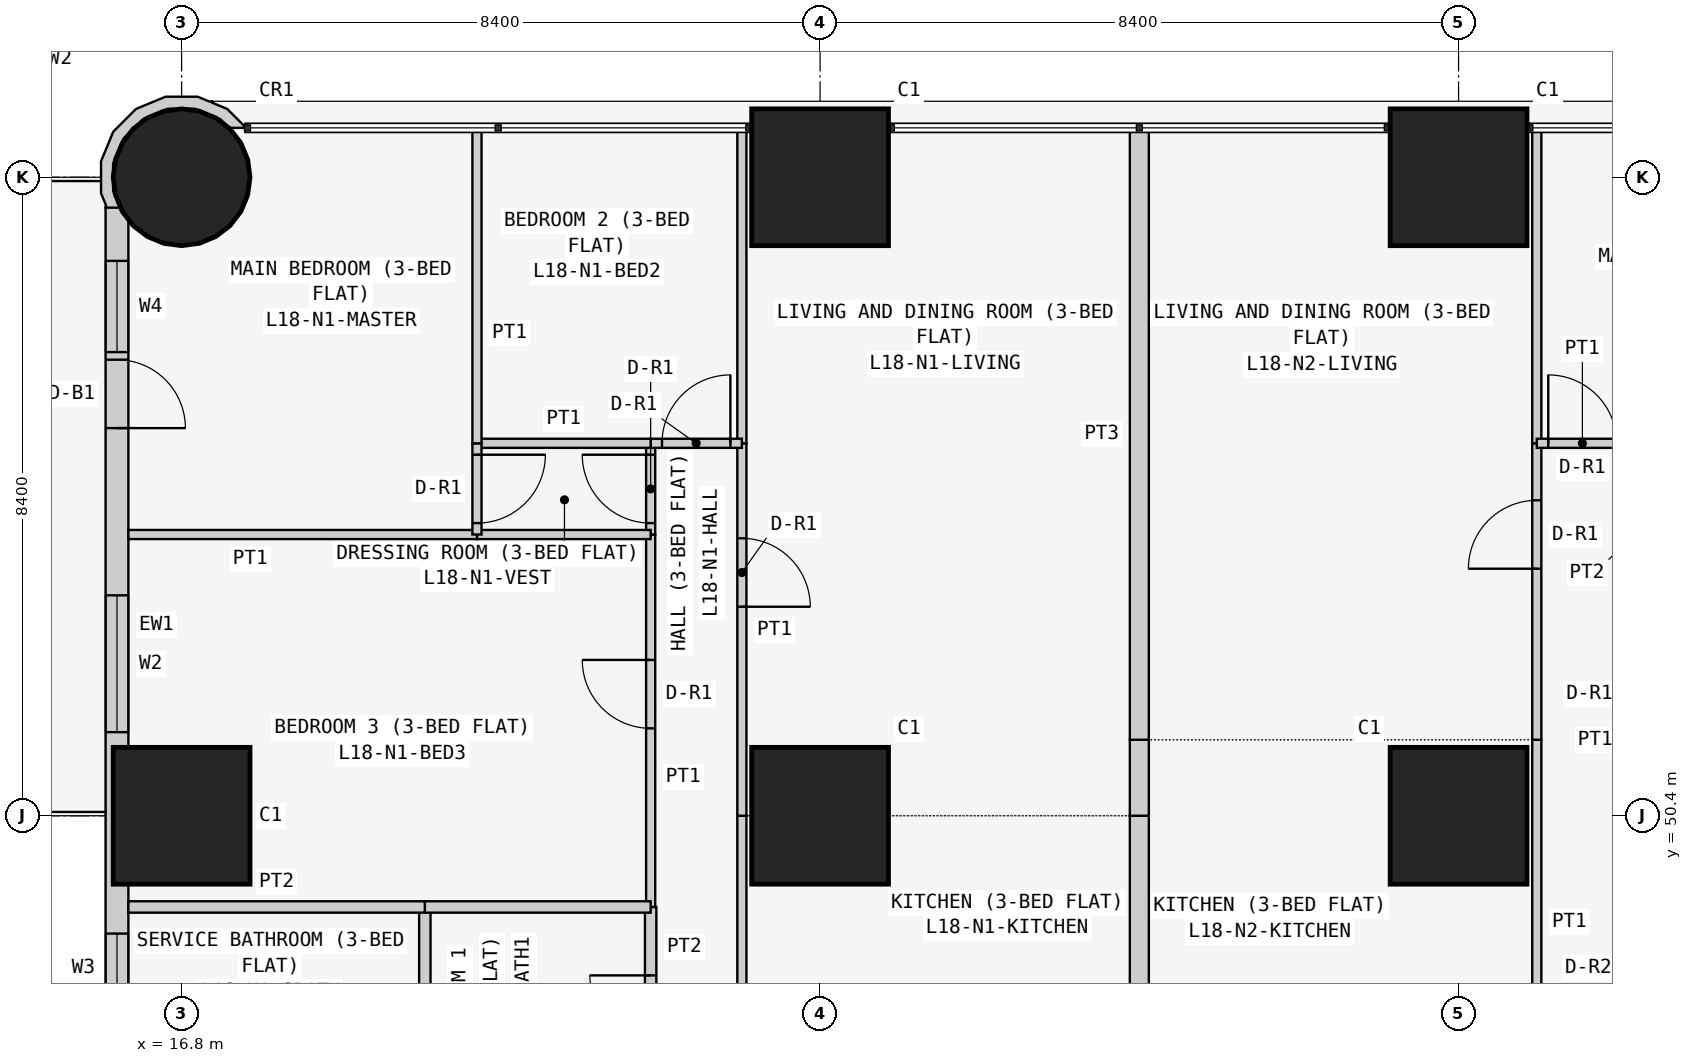
"""IFC4 building model, lengths in metres.
Left out: names, types, materials, properties, quantities, classifications, styles, units other than length and angle.
Written with IfcOpenShell. Run it as: python <this file> out.ifc"""

import sys

from ifc_helpers import new_model, si_unit, direction, frame, frame_2d, origin, origin_2d, place, context, subcontext, project, spatial, polyline, rectangle, circle, outline, extrude, element, fill, save


model = new_model("IFC4")
c1 = context("Model", 3, precision=1e-05, world=origin(), true_north=direction((0.0, 1.0)))
c2 = subcontext(c1, "Body", "Model", "MODEL_VIEW")
j1 = project(units=[si_unit("LENGTHUNIT", "METRE"), si_unit("PLANEANGLEUNIT", "RADIAN")], contexts=[c1])
p1 = place(None, origin())
s1 = spatial("IfcSite", under=j1, at=p1, CompositionType="ELEMENT")
p2 = place(p1, origin())
s2 = spatial("IfcBuilding", under=s1, at=p2, CompositionType="ELEMENT")
p3 = place(p2, frame((0.0, 0.0, 74.1)))
s3 = spatial("IfcBuildingStorey", under=s2, at=p3, CompositionType="ELEMENT", Elevation=74.1)
p4 = place(p3, frame((16.8, 50.4, 0.0), z_axis=(0.0, 0.0, 1.0), x_axis=(1.0, 0.0, 0.0)))
e1 = element("IfcColumn", 1, at=p4, inside=s3, PredefinedType="COLUMN", context=c2, shape_type="SweptSolid", body=[
    extrude(rectangle(XDim=1.8, YDim=1.8, at=origin_2d()), origin(), (0.0, 0.0, 1.0), 3.6),
])
p5 = place(p3, frame((16.8, 58.8, 0.0), z_axis=(0.0, 0.0, 1.0), x_axis=(1.0, 0.0, 0.0)))
e2 = element("IfcColumn", 2, at=p5, inside=s3, PredefinedType="COLUMN", context=c2, shape_type="SweptSolid", body=[
    extrude(circle(Radius=0.9, at=origin_2d()), origin(), (0.0, 0.0, 1.0), 3.6),
])
for number, where, z_axis, x_axis in (
    (3, (25.2, 50.4, 0.0), (0.0, 0.0, 1.0), (1.0, 0.0, 0.0)),
    (4, (25.2, 58.8, 0.0), (0.0, 0.0, 1.0), (1.0, 0.0, 0.0)),
    (5, (33.6, 50.4, 0.0), (0.0, 0.0, 1.0), (1.0, 0.0, 0.0)),
    (6, (33.6, 58.8, 0.0), (0.0, 0.0, 1.0), (1.0, 0.0, 0.0)),
):
    element("IfcColumn", number, at=place(p3, frame(where, z_axis=z_axis, x_axis=x_axis)), inside=s3, PredefinedType="COLUMN", context=c2, shape_type="SweptSolid", body=[
        extrude(rectangle(XDim=1.8, YDim=1.8, at=origin_2d()), origin(), (0.0, 0.0, 1.0), 3.6),
    ])
p6 = place(p3, frame((15.95, 58.4, 0.0), z_axis=(0.0, 0.0, 1.0), x_axis=(0.0, -1.0, 0.0)))
e7 = element("IfcWall", 7, at=p6, inside=s3, PredefinedType="SOLIDWALL", context=c2, shape_type="SweptSolid", body=[
    extrude(rectangle(XDim=15.7, YDim=0.3, at=frame_2d((7.85, 0.0))), origin(), (0.0, 0.0, 1.0), 3.45),
])
p7 = place(p6, frame((12.4, 0.0, 0.9)))
e8 = element("IfcOpeningElement", 8, at=p7, cuts=e7, PredefinedType="OPENING", context=c2, shape_type="SweptSolid", body=[
    extrude(rectangle(XDim=1.8, YDim=1.5, at=frame_2d((0.9, 0.75))), frame((0.0, 0.16, 0.0), z_axis=(0.0, -1.0, 0.0), x_axis=(1.0, 0.0, 0.0)), (0.0, 0.0, 1.0), 0.32),
])
p8 = place(p6, frame((9.55, 0.0, 1.5)))
e9 = element("IfcOpeningElement", 9, at=p8, cuts=e7, PredefinedType="OPENING", context=c2, shape_type="SweptSolid", body=[
    extrude(rectangle(XDim=0.9, YDim=0.7, at=frame_2d((0.45, 0.35))), frame((0.0, 0.16, 0.0), z_axis=(0.0, -1.0, 0.0), x_axis=(1.0, 0.0, 0.0)), (0.0, 0.0, 1.0), 0.32),
])
p9 = place(p6, frame((5.1, 0.0, 0.9)))
e10 = element("IfcOpeningElement", 10, at=p9, cuts=e7, PredefinedType="OPENING", context=c2, shape_type="SweptSolid", body=[
    extrude(rectangle(XDim=1.8, YDim=1.5, at=frame_2d((0.9, 0.75))), frame((0.0, 0.16, 0.0), z_axis=(0.0, -1.0, 0.0), x_axis=(1.0, 0.0, 0.0)), (0.0, 0.0, 1.0), 0.32),
])
p10 = place(p6, frame((2.0, 0.0, 0.0)))
e11 = element("IfcOpeningElement", 11, at=p10, cuts=e7, PredefinedType="OPENING", context=c2, shape_type="SweptSolid", body=[
    extrude(rectangle(XDim=0.9, YDim=2.4, at=frame_2d((0.45, 1.2))), frame((0.0, 0.16, 0.0), z_axis=(0.0, -1.0, 0.0), x_axis=(1.0, 0.0, 0.0)), (0.0, 0.0, 1.0), 0.32),
])
p11 = place(p6, frame((0.7, 0.0, 0.9)))
e12 = element("IfcOpeningElement", 12, at=p11, cuts=e7, PredefinedType="OPENING", context=c2, shape_type="SweptSolid", body=[
    extrude(rectangle(XDim=1.2, YDim=1.5, at=frame_2d((0.6, 0.75))), frame((0.0, 0.16, 0.0), z_axis=(0.0, -1.0, 0.0), x_axis=(1.0, 0.0, 0.0)), (0.0, 0.0, 1.0), 0.32),
])
p12 = place(p3, frame((17.567, 59.411, 0.0), z_axis=(0.0, 0.0, 1.0), x_axis=(-0.377204953059, 0.926129809145, 0.0)))
e13 = element("IfcWall", 13, at=p12, inside=s3, PredefinedType="SOLIDWALL", context=c2, shape_type="SweptSolid", body=[
    extrude(outline(polyline([(-0.27, 2.017), (-0.37, 1.841), (-0.102, 1.842), (0.23, 1.707), (0.484, 1.455), (0.624, 1.125), (0.626, 0.766), (0.491, 0.434), (0.239, 0.18), (0.09, 0.117), (0.011, -0.078), (0.024, -0.083), (0.329, 0.045), (0.48, 0.198), (0.499, 0.193), (0.508, 0.225), (0.626, 0.345), (0.785, 0.736), (0.782, 1.157), (0.619, 1.546), (0.319, 1.842), (-0.072, 2.002), (-0.24, 2.0), (-0.27, 2.017)])), origin(), (0.0, 0.0, 1.0), 3.45),
])
p13 = place(p3, frame((24.171, 50.4, 0.0), z_axis=(0.0, 0.0, 1.0), x_axis=(0.0, -1.0, 0.0)))
e14 = element("IfcWall", 14, at=p13, inside=s3, PredefinedType="PARTITIONING", context=c2, shape_type="SweptSolid", body=[
    extrude(rectangle(XDim=2.4, YDim=0.12, at=frame_2d((1.2, 0.0))), origin(), (0.0, 0.0, 1.0), 3.45),
])
p14 = place(p3, frame((29.4, 48.0, 0.0), z_axis=(0.0, 0.0, 1.0), x_axis=(0.0, 1.0, 0.0)))
e15 = element("IfcWall", 15, at=p14, inside=s3, PredefinedType="PARTITIONING", context=c2, shape_type="SweptSolid", body=[
    extrude(rectangle(XDim=2.4, YDim=0.25, at=frame_2d((1.2, 0.0))), origin(), (0.0, 0.0, 1.0), 2.848),
])
p15 = place(p3, frame((24.171, 55.3, 0.0), z_axis=(0.0, 0.0, 1.0), x_axis=(0.0, -1.0, 0.0)))
e16 = element("IfcWall", 16, at=p15, inside=s3, PredefinedType="PARTITIONING", context=c2, shape_type="SweptSolid", body=[
    extrude(rectangle(XDim=4.9, YDim=0.12, at=frame_2d((2.45, 0.0))), origin(), (0.0, 0.0, 1.0), 3.45),
])
p16 = place(p15, frame((1.25, 0.0, 0.0)))
e17 = element("IfcOpeningElement", 17, at=p16, cuts=e16, PredefinedType="OPENING", context=c2, shape_type="SweptSolid", body=[
    extrude(rectangle(XDim=0.9, YDim=2.1, at=frame_2d((0.45, 1.05))), frame((0.0, 0.07, 0.0), z_axis=(0.0, -1.0, 0.0), x_axis=(1.0, 0.0, 0.0)), (0.0, 0.0, 1.0), 0.14),
])
p17 = place(p3, frame((24.171, 59.45, 0.0), z_axis=(0.0, 0.0, 1.0), x_axis=(0.0, -1.0, 0.0)))
e18 = element("IfcWall", 18, at=p17, inside=s3, PredefinedType="PARTITIONING", context=c2, shape_type="SweptSolid", body=[
    extrude(rectangle(XDim=4.15, YDim=0.12, at=frame_2d((2.075, 0.0))), origin(), (0.0, 0.0, 1.0), 3.45),
])
p18 = place(p3, frame((29.4, 50.4, 0.0), z_axis=(0.0, 0.0, 1.0), x_axis=(0.0, 1.0, 0.0)))
e19 = element("IfcWall", 19, at=p18, inside=s3, PredefinedType="PARTITIONING", context=c2, shape_type="SweptSolid", body=[
    extrude(rectangle(XDim=1.0, YDim=0.25, at=frame_2d((0.5, 0.0))), origin(), (0.0, 0.0, 1.0), 2.848),
])
p19 = place(p3, frame((29.4, 51.4, 0.0), z_axis=(0.0, 0.0, 1.0), x_axis=(0.0, 1.0, 0.0)))
e20 = element("IfcWall", 20, at=p19, inside=s3, PredefinedType="PARTITIONING", context=c2, shape_type="SweptSolid", body=[
    extrude(rectangle(XDim=8.05, YDim=0.25, at=frame_2d((4.025, 0.0))), origin(), (0.0, 0.0, 1.0), 2.848),
])
p20 = place(p3, frame((22.971, 49.2, 0.0), z_axis=(0.0, 0.0, 1.0), x_axis=(0.0, -1.0, 0.0)))
e21 = element("IfcWall", 21, at=p20, inside=s3, PredefinedType="PARTITIONING", context=c2, shape_type="SweptSolid", body=[
    extrude(rectangle(XDim=2.6, YDim=0.15, at=frame_2d((1.3, 0.0))), origin(), (0.0, 0.0, 1.0), 3.45),
])
p21 = place(p20, frame((0.9, 0.0, 0.0)))
e22 = element("IfcOpeningElement", 22, at=p21, cuts=e21, PredefinedType="OPENING", context=c2, shape_type="SweptSolid", body=[
    extrude(rectangle(XDim=0.8, YDim=2.1, at=frame_2d((0.4, 1.05))), frame((0.0, 0.085, 0.0), z_axis=(0.0, -1.0, 0.0), x_axis=(1.0, 0.0, 0.0)), (0.0, 0.0, 1.0), 0.17),
])
p22 = place(p3, frame((22.971, 54.1, 0.0), z_axis=(0.0, 0.0, 1.0), x_axis=(0.0, -1.0, 0.0)))
e23 = element("IfcWall", 23, at=p22, inside=s3, PredefinedType="PARTITIONING", context=c2, shape_type="SweptSolid", body=[
    extrude(rectangle(XDim=4.9, YDim=0.12, at=frame_2d((2.45, 0.0))), origin(), (0.0, 0.0, 1.0), 3.45),
])
p23 = place(p22, frame((1.65, 0.0, 0.0)))
e24 = element("IfcOpeningElement", 24, at=p23, cuts=e23, PredefinedType="OPENING", context=c2, shape_type="SweptSolid", body=[
    extrude(rectangle(XDim=0.9, YDim=2.1, at=frame_2d((0.45, 1.05))), frame((0.0, 0.07, 0.0), z_axis=(0.0, -1.0, 0.0), x_axis=(1.0, 0.0, 0.0)), (0.0, 0.0, 1.0), 0.14),
])
p24 = place(p3, frame((22.971, 55.3, 0.0), z_axis=(0.0, 0.0, 1.0), x_axis=(0.0, -1.0, 0.0)))
e25 = element("IfcWall", 25, at=p24, inside=s3, PredefinedType="PARTITIONING", context=c2, shape_type="SweptSolid", body=[
    extrude(rectangle(XDim=1.2, YDim=0.12, at=frame_2d((0.6, 0.0))), origin(), (0.0, 0.0, 1.0), 3.45),
])
p25 = place(p24, frame((0.15, 0.0, 0.0)))
e26 = element("IfcOpeningElement", 26, at=p25, cuts=e25, PredefinedType="OPENING", context=c2, shape_type="SweptSolid", body=[
    extrude(rectangle(XDim=0.9, YDim=2.1, at=frame_2d((0.45, 1.05))), frame((0.0, 0.07, 0.0), z_axis=(0.0, -1.0, 0.0), x_axis=(1.0, 0.0, 0.0)), (0.0, 0.0, 1.0), 0.14),
])
p26 = place(p3, frame((24.171, 55.3, 0.0), z_axis=(0.0, 0.0, 1.0), x_axis=(-1.0, 0.0, 0.0)))
e27 = element("IfcWall", 27, at=p26, inside=s3, PredefinedType="PARTITIONING", context=c2, shape_type="SweptSolid", body=[
    extrude(rectangle(XDim=1.2, YDim=0.12, at=frame_2d((0.6, 0.0))), origin(), (0.0, 0.0, 1.0), 3.45),
])
p27 = place(p26, frame((0.151, 0.0, 0.0)))
e28 = element("IfcOpeningElement", 28, at=p27, cuts=e27, PredefinedType="OPENING", context=c2, shape_type="SweptSolid", body=[
    extrude(rectangle(XDim=0.9, YDim=2.1, at=frame_2d((0.45, 1.05))), frame((0.0, 0.07, 0.0), z_axis=(0.0, -1.0, 0.0), x_axis=(1.0, 0.0, 0.0)), (0.0, 0.0, 1.0), 0.14),
])
p28 = place(p3, frame((20.0, 49.2, 0.0), z_axis=(0.0, 0.0, 1.0), x_axis=(0.0, -1.0, 0.0)))
e29 = element("IfcWall", 29, at=p28, inside=s3, PredefinedType="PARTITIONING", context=c2, shape_type="SweptSolid", body=[
    extrude(rectangle(XDim=2.6, YDim=0.15, at=frame_2d((1.3, 0.0))), origin(), (0.0, 0.0, 1.0), 3.45),
])
p29 = place(p3, frame((22.971, 49.2, 0.0), z_axis=(0.0, 0.0, 1.0), x_axis=(-1.0, 0.0, 0.0)))
e30 = element("IfcWall", 30, at=p29, inside=s3, PredefinedType="PARTITIONING", context=c2, shape_type="SweptSolid", body=[
    extrude(rectangle(XDim=2.971, YDim=0.15, at=frame_2d((1.485, 0.0))), origin(), (0.0, 0.0, 1.0), 3.45),
])
p30 = place(p3, frame((20.0, 49.2, 0.0), z_axis=(0.0, 0.0, 1.0), x_axis=(-1.0, 0.0, 0.0)))
e31 = element("IfcWall", 31, at=p30, inside=s3, PredefinedType="PARTITIONING", context=c2, shape_type="SweptSolid", body=[
    extrude(rectangle(XDim=3.9, YDim=0.15, at=frame_2d((1.95, 0.0))), origin(), (0.0, 0.0, 1.0), 3.45),
])
p31 = place(p3, frame((22.971, 54.1, 0.0), z_axis=(0.0, 0.0, 1.0), x_axis=(-1.0, 0.0, 0.0)))
e32 = element("IfcWall", 32, at=p31, inside=s3, PredefinedType="PARTITIONING", context=c2, shape_type="SweptSolid", body=[
    extrude(rectangle(XDim=2.285, YDim=0.12, at=frame_2d((1.143, 0.0))), origin(), (0.0, 0.0, 1.0), 3.45),
])
p32 = place(p3, frame((20.686, 54.1, 0.0), z_axis=(0.0, 0.0, 1.0), x_axis=(-1.0, 0.0, 0.0)))
e33 = element("IfcWall", 33, at=p32, inside=s3, PredefinedType="PARTITIONING", context=c2, shape_type="SweptSolid", body=[
    extrude(rectangle(XDim=4.586, YDim=0.12, at=frame_2d((2.293, 0.0))), origin(), (0.0, 0.0, 1.0), 3.45),
])
p33 = place(p3, frame((22.971, 55.3, 0.0), z_axis=(0.0, 0.0, 1.0), x_axis=(-1.0, 0.0, 0.0)))
e34 = element("IfcWall", 34, at=p33, inside=s3, PredefinedType="PARTITIONING", context=c2, shape_type="SweptSolid", body=[
    extrude(rectangle(XDim=2.285, YDim=0.12, at=frame_2d((1.143, 0.0))), origin(), (0.0, 0.0, 1.0), 3.45),
])
p34 = place(p3, frame((20.686, 55.3, 0.0), z_axis=(0.0, 0.0, 1.0), x_axis=(0.0, -1.0, 0.0)))
e35 = element("IfcWall", 35, at=p34, inside=s3, PredefinedType="PARTITIONING", context=c2, shape_type="SweptSolid", body=[
    extrude(rectangle(XDim=1.2, YDim=0.12, at=frame_2d((0.6, 0.0))), origin(), (0.0, 0.0, 1.0), 3.45),
])
p35 = place(p34, frame((0.15, 0.0, 0.0)))
e36 = element("IfcOpeningElement", 36, at=p35, cuts=e35, PredefinedType="OPENING", context=c2, shape_type="SweptSolid", body=[
    extrude(rectangle(XDim=0.9, YDim=2.1, at=frame_2d((0.45, 1.05))), frame((0.0, 0.07, 0.0), z_axis=(0.0, -1.0, 0.0), x_axis=(1.0, 0.0, 0.0)), (0.0, 0.0, 1.0), 0.14),
])
p36 = place(p3, frame((20.686, 59.45, 0.0), z_axis=(0.0, 0.0, 1.0), x_axis=(0.0, -1.0, 0.0)))
e37 = element("IfcWall", 37, at=p36, inside=s3, PredefinedType="PARTITIONING", context=c2, shape_type="SweptSolid", body=[
    extrude(rectangle(XDim=4.15, YDim=0.12, at=frame_2d((2.075, 0.0))), origin(), (0.0, 0.0, 1.0), 3.45),
])
p37 = place(p3, frame((34.629, 51.4, 0.0), z_axis=(0.0, 0.0, 1.0), x_axis=(0.0, -1.0, 0.0)))
e38 = element("IfcWall", 38, at=p37, inside=s3, PredefinedType="PARTITIONING", context=c2, shape_type="SweptSolid", body=[
    extrude(rectangle(XDim=4.8, YDim=0.12, at=frame_2d((2.4, 0.0))), origin(), (0.0, 0.0, 1.0), 3.45),
])
p38 = place(p3, frame((34.629, 55.3, 0.0), z_axis=(0.0, 0.0, 1.0), x_axis=(0.0, -1.0, 0.0)))
e39 = element("IfcWall", 39, at=p38, inside=s3, PredefinedType="PARTITIONING", context=c2, shape_type="SweptSolid", body=[
    extrude(rectangle(XDim=3.9, YDim=0.12, at=frame_2d((1.95, 0.0))), origin(), (0.0, 0.0, 1.0), 3.45),
])
p39 = place(p38, frame((0.75, 0.0, 0.0)))
e40 = element("IfcOpeningElement", 40, at=p39, cuts=e39, PredefinedType="OPENING", context=c2, shape_type="SweptSolid", body=[
    extrude(rectangle(XDim=0.9, YDim=2.1, at=frame_2d((0.45, 1.05))), frame((0.0, 0.07, 0.0), z_axis=(0.0, -1.0, 0.0), x_axis=(1.0, 0.0, 0.0)), (0.0, 0.0, 1.0), 0.14),
])
p40 = place(p3, frame((34.629, 59.45, 0.0), z_axis=(0.0, 0.0, 1.0), x_axis=(0.0, -1.0, 0.0)))
e41 = element("IfcWall", 41, at=p40, inside=s3, PredefinedType="PARTITIONING", context=c2, shape_type="SweptSolid", body=[
    extrude(rectangle(XDim=4.15, YDim=0.12, at=frame_2d((2.075, 0.0))), origin(), (0.0, 0.0, 1.0), 3.45),
])
p41 = place(p3, frame((34.629, 55.3, 0.0), z_axis=(0.0, 0.0, 1.0), x_axis=(1.0, 0.0, 0.0)))
e42 = element("IfcWall", 42, at=p41, inside=s3, PredefinedType="PARTITIONING", context=c2, shape_type="SweptSolid", body=[
    extrude(rectangle(XDim=1.2, YDim=0.12, at=frame_2d((0.6, 0.0))), origin(), (0.0, 0.0, 1.0), 3.45),
])
p42 = place(p41, frame((0.151, 0.0, 0.0)))
e43 = element("IfcOpeningElement", 43, at=p42, cuts=e42, PredefinedType="OPENING", context=c2, shape_type="SweptSolid", body=[
    extrude(rectangle(XDim=0.9, YDim=2.1, at=frame_2d((0.45, 1.05))), frame((0.0, 0.07, 0.0), z_axis=(0.0, -1.0, 0.0), x_axis=(1.0, 0.0, 0.0)), (0.0, 0.0, 1.0), 0.14),
])
p43 = place(p8, origin())
e44 = element("IfcWindow", 44, at=p43, inside=s3, PartitioningType="SINGLE_PANEL", PredefinedType="WINDOW", context=c2, shape_type="SweptSolid", body=[
    extrude(rectangle(XDim=0.9, YDim=0.7, at=frame_2d((0.45, 0.35))), frame((0.0, 0.03, 0.0), z_axis=(0.0, -1.0, 0.0), x_axis=(1.0, 0.0, 0.0)), (0.0, 0.0, 1.0), 0.06),
])
fill(e9, e44)
p44 = place(p9, origin())
e45 = element("IfcWindow", 45, at=p44, inside=s3, PartitioningType="SINGLE_PANEL", PredefinedType="WINDOW", context=c2, shape_type="SweptSolid", body=[
    extrude(rectangle(XDim=1.8, YDim=1.5, at=frame_2d((0.9, 0.75))), frame((0.0, 0.03, 0.0), z_axis=(0.0, -1.0, 0.0), x_axis=(1.0, 0.0, 0.0)), (0.0, 0.0, 1.0), 0.06),
])
fill(e10, e45)
p45 = place(p10, origin())
e46 = element("IfcDoor", 46, at=p45, inside=s3, OperationType="SINGLE_SWING_RIGHT", PredefinedType="DOOR", context=c2, shape_type="SweptSolid", body=[
    extrude(rectangle(XDim=0.9, YDim=2.4, at=frame_2d((0.45, 1.2))), frame((0.0, 0.025, 0.0), z_axis=(0.0, -1.0, 0.0), x_axis=(1.0, 0.0, 0.0)), (0.0, 0.0, 1.0), 0.05),
])
fill(e11, e46)
p46 = place(p11, origin())
e47 = element("IfcWindow", 47, at=p46, inside=s3, PartitioningType="SINGLE_PANEL", PredefinedType="WINDOW", context=c2, shape_type="SweptSolid", body=[
    extrude(rectangle(XDim=1.2, YDim=1.5, at=frame_2d((0.6, 0.75))), frame((0.0, 0.03, 0.0), z_axis=(0.0, -1.0, 0.0), x_axis=(1.0, 0.0, 0.0)), (0.0, 0.0, 1.0), 0.06),
])
fill(e12, e47)
p47 = place(p16, origin())
e48 = element("IfcDoor", 48, at=p47, inside=s3, OperationType="SINGLE_SWING_RIGHT", PredefinedType="DOOR", context=c2, shape_type="SweptSolid", body=[
    extrude(rectangle(XDim=0.9, YDim=2.1, at=frame_2d((0.45, 1.05))), frame((0.0, 0.025, 0.0), z_axis=(0.0, -1.0, 0.0), x_axis=(1.0, 0.0, 0.0)), (0.0, 0.0, 1.0), 0.05),
])
fill(e17, e48)
p48 = place(p21, frame((0.8, 0.0, 0.0), z_axis=(0.0, 0.0, 1.0), x_axis=(-1.0, 0.0, 0.0)))
e49 = element("IfcDoor", 49, at=p48, inside=s3, OperationType="SINGLE_SWING_RIGHT", PredefinedType="DOOR", context=c2, shape_type="SweptSolid", body=[
    extrude(rectangle(XDim=0.8, YDim=2.1, at=frame_2d((0.4, 1.05))), frame((0.0, 0.025, 0.0), z_axis=(0.0, -1.0, 0.0), x_axis=(1.0, 0.0, 0.0)), (0.0, 0.0, 1.0), 0.05),
])
fill(e22, e49)
p49 = place(p23, frame((0.9, 0.0, 0.0), z_axis=(0.0, 0.0, 1.0), x_axis=(-1.0, 0.0, 0.0)))
e50 = element("IfcDoor", 50, at=p49, inside=s3, OperationType="SINGLE_SWING_RIGHT", PredefinedType="DOOR", context=c2, shape_type="SweptSolid", body=[
    extrude(rectangle(XDim=0.9, YDim=2.1, at=frame_2d((0.45, 1.05))), frame((0.0, 0.025, 0.0), z_axis=(0.0, -1.0, 0.0), x_axis=(1.0, 0.0, 0.0)), (0.0, 0.0, 1.0), 0.05),
])
fill(e24, e50)
p50 = place(p25, frame((0.9, 0.0, 0.0), z_axis=(0.0, 0.0, 1.0), x_axis=(-1.0, 0.0, 0.0)))
e51 = element("IfcDoor", 51, at=p50, inside=s3, OperationType="SINGLE_SWING_RIGHT", PredefinedType="DOOR", context=c2, shape_type="SweptSolid", body=[
    extrude(rectangle(XDim=0.9, YDim=2.1, at=frame_2d((0.45, 1.05))), frame((0.0, 0.025, 0.0), z_axis=(0.0, -1.0, 0.0), x_axis=(1.0, 0.0, 0.0)), (0.0, 0.0, 1.0), 0.05),
])
fill(e26, e51)
p51 = place(p35, origin())
e52 = element("IfcDoor", 52, at=p51, inside=s3, OperationType="SINGLE_SWING_LEFT", PredefinedType="DOOR", context=c2, shape_type="SweptSolid", body=[
    extrude(rectangle(XDim=0.9, YDim=2.1, at=frame_2d((0.45, 1.05))), frame((0.0, 0.025, 0.0), z_axis=(0.0, -1.0, 0.0), x_axis=(1.0, 0.0, 0.0)), (0.0, 0.0, 1.0), 0.05),
])
fill(e36, e52)
p52 = place(p27, frame((0.9, 0.0, 0.0), z_axis=(0.0, 0.0, 1.0), x_axis=(-1.0, 0.0, 0.0)))
e53 = element("IfcDoor", 53, at=p52, inside=s3, OperationType="SINGLE_SWING_RIGHT", PredefinedType="DOOR", context=c2, shape_type="SweptSolid", body=[
    extrude(rectangle(XDim=0.9, YDim=2.1, at=frame_2d((0.45, 1.05))), frame((0.0, 0.025, 0.0), z_axis=(0.0, -1.0, 0.0), x_axis=(1.0, 0.0, 0.0)), (0.0, 0.0, 1.0), 0.05),
])
fill(e28, e53)
p53 = place(p39, frame((0.9, 0.0, 0.0), z_axis=(0.0, 0.0, 1.0), x_axis=(-1.0, 0.0, 0.0)))
e54 = element("IfcDoor", 54, at=p53, inside=s3, OperationType="SINGLE_SWING_LEFT", PredefinedType="DOOR", context=c2, shape_type="SweptSolid", body=[
    extrude(rectangle(XDim=0.9, YDim=2.1, at=frame_2d((0.45, 1.05))), frame((0.0, 0.025, 0.0), z_axis=(0.0, -1.0, 0.0), x_axis=(1.0, 0.0, 0.0)), (0.0, 0.0, 1.0), 0.05),
])
fill(e40, e54)
p54 = place(p42, origin())
e55 = element("IfcDoor", 55, at=p54, inside=s3, OperationType="SINGLE_SWING_LEFT", PredefinedType="DOOR", context=c2, shape_type="SweptSolid", body=[
    extrude(rectangle(XDim=0.9, YDim=2.1, at=frame_2d((0.45, 1.05))), frame((0.0, 0.025, 0.0), z_axis=(0.0, -1.0, 0.0), x_axis=(1.0, 0.0, 0.0)), (0.0, 0.0, 1.0), 0.05),
])
fill(e43, e55)
save(model, sys.argv[1])
